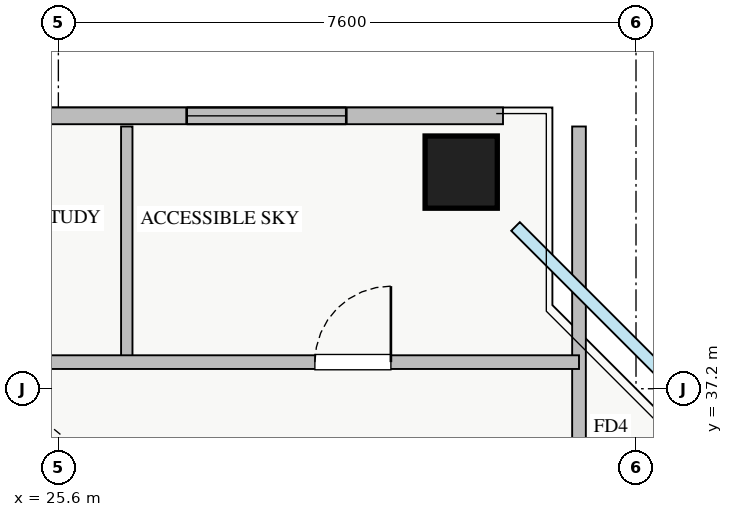
"""IFC4 building model, lengths in metres.
Left out: names, types, materials, properties, quantities, classifications, styles, units other than length and angle.
Written with IfcOpenShell. Run it as: python <this file> out.ifc"""

import sys

from ifc_helpers import new_model, si_unit, direction, frame, frame_2d, origin, origin_2d, place, context, subcontext, project, spatial, rectangle, extrude, source, transform, mapped, element, fill, save


model = new_model("IFC4")
c1 = context("Model", 3, precision=1e-05, world=origin(), true_north=direction((0.0, 1.0)))
c2 = subcontext(c1, "Body", "Model", "MODEL_VIEW")
j1 = project(units=[si_unit("LENGTHUNIT", "METRE"), si_unit("PLANEANGLEUNIT", "RADIAN")], contexts=[c1])
p1 = place(None, origin())
s1 = spatial("IfcSite", under=j1, at=p1, CompositionType="ELEMENT")
p2 = place(p1, origin())
s2 = spatial("IfcBuilding", under=s1, at=p2, CompositionType="ELEMENT")
p3 = place(p2, frame((0.0, 0.0, 163.25)))
s3 = spatial("IfcBuildingStorey", under=s2, at=p3, CompositionType="ELEMENT", Elevation=163.25)
m1 = source(origin(), c2, "Body", "SweptSolid", [
    extrude(rectangle(XDim=0.95, YDim=0.95, at=origin_2d()), origin(), (0.0, 0.0, 1.0), 3.25),
])
p4 = place(p3, frame((30.9, 40.05, 0.0), z_axis=(0.0, 0.0, 1.0), x_axis=(1.0, 0.0, 0.0)))
e1 = element("IfcColumn", 1, at=p4, inside=s3, PredefinedType="COLUMN", context=c2, shape_type="MappedRepresentation", body=[
    mapped(m1, transform((0.0, 0.0, 0.0), x_axis=(1.0, 0.0, 0.0), y_axis=(0.0, 1.0, 0.0), z_axis=(0.0, 0.0, 1.0), scale=1.0)),
])
p5 = place(p3, frame((6.55, 40.79, 0.0), z_axis=(0.0, 0.0, 1.0), x_axis=(1.0, 0.0, 0.0)))
e2 = element("IfcWall", 2, at=p5, inside=s3, PredefinedType="STANDARD", context=c2, shape_type="SweptSolid", body=[
    extrude(rectangle(XDim=24.9, YDim=0.22, at=frame_2d((12.45, 0.0))), origin(), (0.0, 0.0, 1.0), 2.61),
])
p6 = place(p5, frame((3.833, 0.0, 0.9)))
e3 = element("IfcOpeningElement", 3, at=p6, cuts=e2, PredefinedType="OPENING", context=c2, shape_type="SweptSolid", body=[
    extrude(rectangle(XDim=2.4, YDim=1.5, at=frame_2d((1.2, 0.75))), frame((0.0, 0.12, 0.0), z_axis=(0.0, -1.0, 0.0), x_axis=(1.0, 0.0, 0.0)), (0.0, 0.0, 1.0), 0.24),
])
p7 = place(p5, frame((8.438, 0.0, 0.9)))
e4 = element("IfcOpeningElement", 4, at=p7, cuts=e2, PredefinedType="OPENING", context=c2, shape_type="SweptSolid", body=[
    extrude(rectangle(XDim=1.8, YDim=1.45, at=frame_2d((0.9, 0.725))), frame((0.0, 0.12, 0.0), z_axis=(0.0, -1.0, 0.0), x_axis=(1.0, 0.0, 0.0)), (0.0, 0.0, 1.0), 0.24),
])
p8 = place(p5, frame((14.813, 0.0, 0.9)))
e5 = element("IfcOpeningElement", 5, at=p8, cuts=e2, PredefinedType="OPENING", context=c2, shape_type="SweptSolid", body=[
    extrude(rectangle(XDim=1.5, YDim=1.45, at=frame_2d((0.75, 0.725))), frame((0.0, 0.12, 0.0), z_axis=(0.0, -1.0, 0.0), x_axis=(1.0, 0.0, 0.0)), (0.0, 0.0, 1.0), 0.24),
])
p9 = place(p5, frame((20.738, 0.0, 0.9)))
e6 = element("IfcOpeningElement", 6, at=p9, cuts=e2, PredefinedType="OPENING", context=c2, shape_type="SweptSolid", body=[
    extrude(rectangle(XDim=2.1, YDim=1.48, at=frame_2d((1.05, 0.74))), frame((0.0, 0.12, 0.0), z_axis=(0.0, -1.0, 0.0), x_axis=(1.0, 0.0, 0.0)), (0.0, 0.0, 1.0), 0.24),
])
p10 = place(p3, frame((32.45, 29.3, 0.0), z_axis=(0.0, 0.0, 1.0), x_axis=(0.0, 1.0, 0.0)))
e7 = element("IfcWall", 7, at=p10, inside=s3, PredefinedType="PARTITIONING", context=c2, shape_type="SweptSolid", body=[
    extrude(rectangle(XDim=11.35, YDim=0.18, at=frame_2d((5.675, 0.0))), origin(), (0.0, 0.0, 1.0), 3.07),
])
p11 = place(p10, frame((1.9, 0.0, 0.0)))
e8 = element("IfcOpeningElement", 8, at=p11, cuts=e7, PredefinedType="OPENING", context=c2, shape_type="SweptSolid", body=[
    extrude(rectangle(XDim=1.0, YDim=2.05, at=frame_2d((0.5, 1.025))), frame((0.0, 0.1, 0.0), z_axis=(0.0, -1.0, 0.0), x_axis=(1.0, 0.0, 0.0)), (0.0, 0.0, 1.0), 0.2),
])
p12 = place(p10, frame((5.95, 0.0, 0.0)))
e9 = element("IfcOpeningElement", 9, at=p12, cuts=e7, PredefinedType="OPENING", context=c2, shape_type="SweptSolid", body=[
    extrude(rectangle(XDim=1.0, YDim=2.05, at=frame_2d((0.5, 1.025))), frame((0.0, 0.1, 0.0), z_axis=(0.0, -1.0, 0.0), x_axis=(1.0, 0.0, 0.0)), (0.0, 0.0, 1.0), 0.2),
])
p13 = place(p3, frame((26.5, 37.55, 0.0), z_axis=(0.0, 0.0, 1.0), x_axis=(0.0, 1.0, 0.0)))
e10 = element("IfcWall", 10, at=p13, inside=s3, PredefinedType="PARTITIONING", context=c2, shape_type="SweptSolid", body=[
    extrude(rectangle(XDim=3.1, YDim=0.15, at=frame_2d((1.55, 0.0))), origin(), (0.0, 0.0, 1.0), 3.07),
])
p14 = place(p3, frame((8.65, 37.55, 0.0), z_axis=(0.0, 0.0, 1.0), x_axis=(1.0, 0.0, 0.0)))
e11 = element("IfcWall", 11, at=p14, inside=s3, PredefinedType="PARTITIONING", context=c2, shape_type="SweptSolid", body=[
    extrude(rectangle(XDim=23.8, YDim=0.18, at=frame_2d((11.9, 0.0))), origin(), (0.0, 0.0, 1.0), 3.07),
])
p15 = place(p14, frame((2.425, 0.0, 0.0)))
e12 = element("IfcOpeningElement", 12, at=p15, cuts=e11, PredefinedType="OPENING", context=c2, shape_type="SweptSolid", body=[
    extrude(rectangle(XDim=1.0, YDim=2.05, at=frame_2d((0.5, 1.025))), frame((0.0, 0.1, 0.0), z_axis=(0.0, -1.0, 0.0), x_axis=(1.0, 0.0, 0.0)), (0.0, 0.0, 1.0), 0.2),
])
p16 = place(p14, frame((8.35, 0.0, 0.0)))
e13 = element("IfcOpeningElement", 13, at=p16, cuts=e11, PredefinedType="OPENING", context=c2, shape_type="SweptSolid", body=[
    extrude(rectangle(XDim=1.0, YDim=2.05, at=frame_2d((0.5, 1.025))), frame((0.0, 0.1, 0.0), z_axis=(0.0, -1.0, 0.0), x_axis=(1.0, 0.0, 0.0)), (0.0, 0.0, 1.0), 0.2),
])
p17 = place(p14, frame((14.35, 0.0, 0.0)))
e14 = element("IfcOpeningElement", 14, at=p17, cuts=e11, PredefinedType="OPENING", context=c2, shape_type="SweptSolid", body=[
    extrude(rectangle(XDim=1.0, YDim=2.05, at=frame_2d((0.5, 1.025))), frame((0.0, 0.1, 0.0), z_axis=(0.0, -1.0, 0.0), x_axis=(1.0, 0.0, 0.0)), (0.0, 0.0, 1.0), 0.2),
])
p18 = place(p14, frame((20.325, 0.0, 0.0)))
e15 = element("IfcOpeningElement", 15, at=p18, cuts=e11, PredefinedType="OPENING", context=c2, shape_type="SweptSolid", body=[
    extrude(rectangle(XDim=1.0, YDim=2.05, at=frame_2d((0.5, 1.025))), frame((0.0, 0.1, 0.0), z_axis=(0.0, -1.0, 0.0), x_axis=(1.0, 0.0, 0.0)), (0.0, 0.0, 1.0), 0.2),
])
m2 = source(origin(), c2, "Body", "SweptSolid", [
    extrude(rectangle(XDim=2.1, YDim=1.48, at=frame_2d((1.05, 0.74))), frame((0.0, 0.03, 0.0), z_axis=(0.0, -1.0, 0.0), x_axis=(1.0, 0.0, 0.0)), (0.0, 0.0, 1.0), 0.06),
])
p19 = place(p9, origin())
e16 = element("IfcWindow", 16, at=p19, inside=s3, PartitioningType="TRIPLE_PANEL_VERTICAL", PredefinedType="WINDOW", context=c2, shape_type="MappedRepresentation", body=[
    mapped(m2, transform((0.0, 0.0, 0.0), x_axis=(1.0, 0.0, 0.0), y_axis=(0.0, 1.0, 0.0), z_axis=(0.0, 0.0, 1.0), scale=1.0)),
])
fill(e6, e16)
m3 = source(origin(), c2, "Body", "SweptSolid", [
    extrude(rectangle(XDim=1.0, YDim=2.05, at=frame_2d((0.5, 1.025))), frame((0.0, 0.025, 0.0), z_axis=(0.0, -1.0, 0.0), x_axis=(1.0, 0.0, 0.0)), (0.0, 0.0, 1.0), 0.05),
])
p20 = place(p18, origin())
e17 = element("IfcDoor", 17, at=p20, inside=s3, OperationType="SINGLE_SWING_RIGHT", PredefinedType="DOOR", context=c2, shape_type="MappedRepresentation", body=[
    mapped(m3, transform((0.0, 0.0, 0.0), x_axis=(1.0, 0.0, 0.0), y_axis=(0.0, 1.0, 0.0), z_axis=(0.0, 0.0, 1.0), scale=1.0)),
])
fill(e15, e17)
save(model, sys.argv[1])
